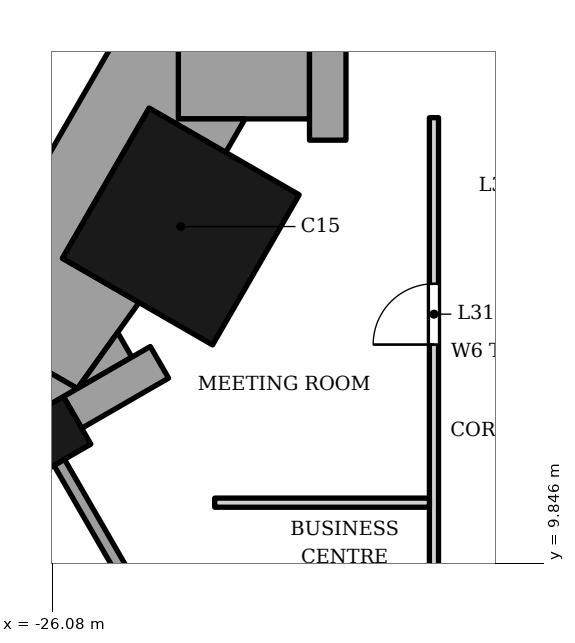
"""IFC4 building model, lengths in metres.
Left out: names, types, materials, properties, quantities, classifications, styles, units other than length and angle.
Written with IfcOpenShell. Run it as: python <this file> out.ifc"""

import sys

from ifc_helpers import new_model, si_unit, direction, frame, frame_2d, origin, origin_2d, place, context, subcontext, project, spatial, polyline, rectangle, outline, extrude, element, fill, save


model = new_model("IFC4")
c1 = context("Model", 3, precision=1e-05, world=origin(), true_north=direction((0.0, 1.0)))
c2 = subcontext(c1, "Body", "Model", "MODEL_VIEW")
j1 = project(units=[si_unit("LENGTHUNIT", "METRE"), si_unit("PLANEANGLEUNIT", "RADIAN")], contexts=[c1])
p1 = place(None, origin())
s1 = spatial("IfcSite", under=j1, at=p1, CompositionType="ELEMENT")
p2 = place(p1, origin())
s2 = spatial("IfcBuilding", under=s1, at=p2, CompositionType="ELEMENT")
p3 = place(p2, frame((0.0, 0.0, 132.6)))
s3 = spatial("IfcBuildingStorey", under=s2, at=p3, CompositionType="ELEMENT", Elevation=132.6)
p4 = place(p3, frame((-23.963, 15.382, 0.0), z_axis=(0.0, 0.0, 1.0), x_axis=(0.866025403784, -0.5, 0.0)))
e1 = element("IfcColumn", 1, at=p4, inside=s3, PredefinedType="COLUMN", context=c2, shape_type="SweptSolid", body=[
    extrude(rectangle(XDim=2.85, YDim=2.85, at=origin_2d()), origin(), (0.0, 0.0, 1.0), 7.0),
])
p5 = place(p3, frame((-26.188, 11.894, 0.0), z_axis=(0.0, 0.0, 1.0), x_axis=(0.5, -0.866025403784, 0.0)))
e2 = element("IfcColumn", 2, at=p5, inside=s3, PredefinedType="COLUMN", context=c2, shape_type="SweptSolid", body=[
    extrude(rectangle(XDim=0.9, YDim=1.2, at=origin_2d()), origin(), (0.0, 0.0, 1.0), 7.0),
])
p6 = place(p3, frame((-25.744, 12.324, 0.0), z_axis=(0.0, 0.0, 1.0), x_axis=(0.865976140824, 0.500085316245, 0.0)))
e3 = element("IfcWall", 3, at=p6, inside=s3, PredefinedType="SOLIDWALL", context=c2, shape_type="SweptSolid", body=[
    extrude(rectangle(XDim=1.65, YDim=0.6, at=frame_2d((0.825, 0.0))), origin(), (0.0, 0.0, 1.0), 6.0),
])
p7 = place(p3, frame((-25.963, 11.505, 0.0), z_axis=(0.0, 0.0, 1.0), x_axis=(0.500012057535, -0.866018442252, 0.0)))
e4 = element("IfcWall", 4, at=p7, inside=s3, PredefinedType="SOLIDWALL", context=c2, shape_type="SweptSolid", body=[
    extrude(rectangle(XDim=3.6, YDim=0.2, at=frame_2d((1.8, 0.0))), origin(), (0.0, 0.0, 1.0), 6.0),
])
p8 = place(p3, origin())
e5 = element("IfcWall", 5, at=p8, inside=s3, PredefinedType="SOLIDWALL", context=c2, shape_type="SweptSolid", body=[
    extrude(outline(polyline([(-21.847, 18.453), (-21.847, 16.802), (-21.247, 16.802), (-21.247, 18.453), (-21.847, 18.453)])), origin(), (0.0, 0.0, 1.0), 6.0),
])
p9 = place(p3, origin())
e6 = element("IfcWall", 6, at=p9, inside=s3, PredefinedType="SOLIDWALL", context=c2, shape_type="SweptSolid", body=[
    extrude(outline(polyline([(-24.004, 17.153), (-21.847, 17.153), (-21.847, 18.453), (-21.847, 18.453), (-21.847, 19.653), (-24.004, 19.653), (-24.004, 17.153)])), origin(), (0.0, 0.0, 1.0), 6.0),
])
p10 = place(p3, origin())
e7 = element("IfcWall", 7, at=p10, inside=s3, PredefinedType="SOLIDWALL", context=c2, shape_type="SweptSolid", body=[
    extrude(outline(polyline([(-23.225, 16.601), (-22.907, 17.153), (-24.004, 17.153), (-24.004, 19.052), (-24.523, 19.353), (-27.682, 13.882), (-25.664, 12.717), (-24.65, 14.133), (-25.91, 14.86), (-24.485, 17.329), (-23.225, 16.601)])), origin(), (0.0, 0.0, 1.0), 6.0),
])
p11 = place(p3, origin())
e8 = element("IfcWall", 8, at=p11, inside=s3, PredefinedType="SOLIDWALL", context=c2, shape_type="SweptSolid", body=[
    extrude(outline(polyline([(-27.162, 13.582), (-27.682, 13.282), (-26.933, 11.984), (-25.664, 12.717), (-27.162, 13.582)])), origin(), (0.0, 0.0, 1.0), 6.0),
])
p12 = place(p3, origin())
e9 = element("IfcWall", 9, at=p12, inside=s3, PredefinedType="SOLIDWALL", context=c2, shape_type="SweptSolid", body=[
    extrude(outline(polyline([(-24.768, 13.234), (-25.002, 13.641), (-25.664, 12.717), (-24.768, 13.234)])), origin(), (0.0, 0.0, 1.0), 6.0),
])
p13 = place(p3, frame((-19.8, 5.369, 0.0), z_axis=(0.0, 0.0, 1.0), x_axis=(0.0, 1.0, 0.0)))
e10 = element("IfcWall", 10, at=p13, inside=s3, PredefinedType="PARTITIONING", context=c2, shape_type="SweptSolid", body=[
    extrude(rectangle(XDim=11.804, YDim=0.15, at=frame_2d((5.902, 0.0))), origin(), (0.0, 0.0, 1.0), 6.7),
])
p14 = place(p13, frame((8.073, 0.0, 0.0)))
e11 = element("IfcOpeningElement", 11, at=p14, cuts=e10, PredefinedType="OPENING", context=c2, shape_type="SweptSolid", body=[
    extrude(rectangle(XDim=1.0, YDim=2.1, at=frame_2d((0.5, 1.05))), frame((0.0, 0.085, 0.0), z_axis=(0.0, -1.0, 0.0), x_axis=(1.0, 0.0, 0.0)), (0.0, 0.0, 1.0), 0.17),
])
p15 = place(p13, frame((1.661, 0.0, 0.0)))
e12 = element("IfcOpeningElement", 12, at=p15, cuts=e10, PredefinedType="OPENING", context=c2, shape_type="SweptSolid", body=[
    extrude(rectangle(XDim=1.0, YDim=2.1, at=frame_2d((0.5, 1.05))), frame((0.0, 0.085, 0.0), z_axis=(0.0, -1.0, 0.0), x_axis=(1.0, 0.0, 0.0)), (0.0, 0.0, 1.0), 0.17),
])
p16 = place(p3, frame((-23.406, 10.841, 0.0), z_axis=(0.0, 0.0, 1.0), x_axis=(1.0, 0.0, 0.0)))
e13 = element("IfcWall", 13, at=p16, inside=s3, PredefinedType="PARTITIONING", context=c2, shape_type="SweptSolid", body=[
    extrude(rectangle(XDim=3.531, YDim=0.15, at=frame_2d((1.766, 0.0))), origin(), (0.0, 0.0, 1.0), 6.172),
])
p17 = place(p14, origin())
e14 = element("IfcDoor", 14, at=p17, inside=s3, OperationType="SINGLE_SWING_LEFT", PredefinedType="DOOR", context=c2, shape_type="SweptSolid", body=[
    extrude(rectangle(XDim=1.0, YDim=2.1, at=frame_2d((0.5, 1.05))), frame((0.0, 0.025, 0.0), z_axis=(0.0, -1.0, 0.0), x_axis=(1.0, 0.0, 0.0)), (0.0, 0.0, 1.0), 0.05),
])
fill(e11, e14)
save(model, sys.argv[1])
